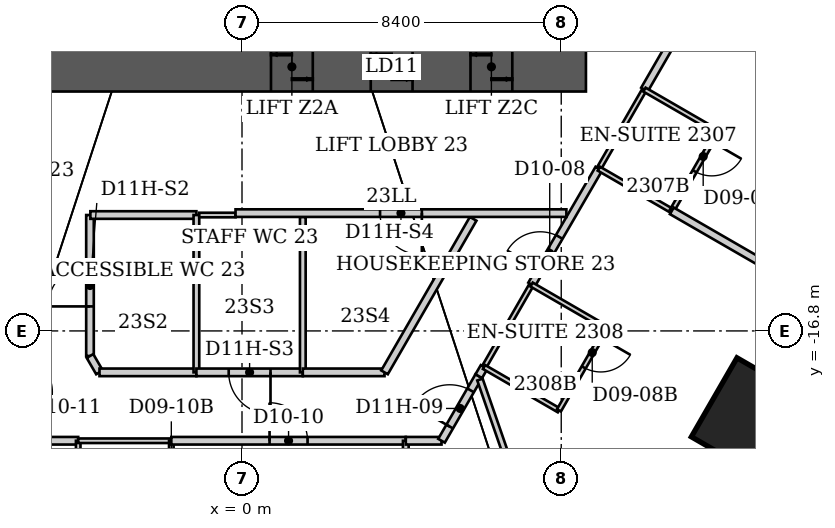
"""IFC4 building model, lengths in metres.
Left out: names, types, materials, properties, quantities, classifications, styles, units other than length and angle.
Written with IfcOpenShell. Run it as: python <this file> out.ifc"""

import sys

from ifc_helpers import new_model, si_unit, direction, frame, frame_2d, origin, origin_2d, place, context, subcontext, project, spatial, rectangle, extrude, clip, halfspace, element, fill, save


model = new_model("IFC4")
c1 = context("Model", 3, precision=1e-05, world=origin(), true_north=direction((0.0, 1.0)))
c2 = subcontext(c1, "Body", "Model", "MODEL_VIEW")
j1 = project(units=[si_unit("LENGTHUNIT", "METRE"), si_unit("PLANEANGLEUNIT", "RADIAN")], contexts=[c1])
p1 = place(None, origin())
s1 = spatial("IfcSite", under=j1, at=p1, CompositionType="ELEMENT")
p2 = place(p1, origin())
s2 = spatial("IfcBuilding", under=s1, at=p2, CompositionType="ELEMENT")
p3 = place(p2, frame((0.0, 0.0, 96.8)))
s3 = spatial("IfcBuildingStorey", under=s2, at=p3, CompositionType="ELEMENT", Elevation=96.8)
p4 = place(p3, frame((13.464, -19.147, -0.064), z_axis=(0.0, 0.0, 1.0), x_axis=(0.866025403784, -0.5, 0.0)))
e1 = element("IfcColumn", 1, at=p4, inside=s3, PredefinedType="COLUMN", context=c2, shape_type="SweptSolid", body=[
    clip(extrude(rectangle(XDim=2.4, YDim=2.4, at=origin_2d()), origin(), (0.0, 0.0, 1.0), 3.865), halfspace(frame((0.0, 0.0, 0.064)), True)),
])
p5 = place(p3, frame((-9.05, -9.85, 0.0), z_axis=(0.0, 0.0, 1.0), x_axis=(1.0, 0.0, 0.0)))
e2 = element("IfcWall", 2, at=p5, inside=s3, PredefinedType="SHEAR", context=c2, shape_type="SweptSolid", body=[
    extrude(rectangle(XDim=18.1, YDim=1.3, at=frame_2d((9.05, 0.0))), origin(), (0.0, 0.0, 1.0), 3.8),
])
p6 = place(p5, frame((1.938, 0.0, 0.0)))
e3 = element("IfcOpeningElement", 3, at=p6, cuts=e2, PredefinedType="OPENING", context=c2, shape_type="SweptSolid", body=[
    extrude(rectangle(XDim=1.1, YDim=2.2, at=frame_2d((0.55, 1.1))), frame((0.0, 0.65, 0.0), z_axis=(0.0, -1.0, 0.0), x_axis=(1.0, 0.0, 0.0)), (0.0, 0.0, 1.0), 1.3),
])
p7 = place(p5, frame((9.812, 0.0, 0.0)))
e4 = element("IfcOpeningElement", 4, at=p7, cuts=e2, PredefinedType="OPENING", context=c2, shape_type="SweptSolid", body=[
    extrude(rectangle(XDim=1.1, YDim=2.1, at=frame_2d((0.55, 1.05))), frame((0.0, 0.65, 0.0), z_axis=(0.0, -1.0, 0.0), x_axis=(1.0, 0.0, 0.0)), (0.0, 0.0, 1.0), 1.3),
])
p8 = place(p5, frame((12.438, 0.0, 0.0)))
e5 = element("IfcOpeningElement", 5, at=p8, cuts=e2, PredefinedType="OPENING", context=c2, shape_type="SweptSolid", body=[
    extrude(rectangle(XDim=1.1, YDim=2.1, at=frame_2d((0.55, 1.05))), frame((0.0, 0.65, 0.0), z_axis=(0.0, -1.0, 0.0), x_axis=(1.0, 0.0, 0.0)), (0.0, 0.0, 1.0), 1.3),
])
p9 = place(p5, frame((15.062, 0.0, 0.0)))
e6 = element("IfcOpeningElement", 6, at=p9, cuts=e2, PredefinedType="OPENING", context=c2, shape_type="SweptSolid", body=[
    extrude(rectangle(XDim=1.1, YDim=2.1, at=frame_2d((0.55, 1.05))), frame((0.0, 0.65, 0.0), z_axis=(0.0, -1.0, 0.0), x_axis=(1.0, 0.0, 0.0)), (0.0, 0.0, 1.0), 1.3),
])
p10 = place(p3, frame((11.024, -29.171, 0.0), z_axis=(0.0, 0.0, 1.0), x_axis=(0.499999235055, 0.866025845425, 0.0)))
e7 = element("IfcWall", 7, at=p10, inside=s3, PredefinedType="PARAPET", context=c2, shape_type="SweptSolid", body=[
    extrude(rectangle(XDim=39.5, YDim=0.25, at=frame_2d((19.75, 0.0))), origin(), (0.0, 0.0, 1.0), 1.1),
])
p11 = place(p3, frame((-5.25, -19.69, 0.0), z_axis=(0.0, 0.0, 1.0), x_axis=(1.0, 0.0, 0.0)))
e8 = element("IfcWall", 8, at=p11, inside=s3, PredefinedType="PARTITIONING", context=c2, shape_type="SweptSolid", body=[
    extrude(rectangle(XDim=0.94, YDim=0.2, at=frame_2d((0.47, 0.0))), origin(), (0.0, 0.0, 1.0), 3.64),
])
p12 = place(p3, frame((-4.31, -22.36, 0.0), z_axis=(0.0, 0.0, 1.0), x_axis=(0.0, 1.0, 0.0)))
e9 = element("IfcWall", 9, at=p12, inside=s3, PredefinedType="PARTITIONING", context=c2, shape_type="SweptSolid", body=[
    extrude(rectangle(XDim=2.67, YDim=0.12, at=frame_2d((1.335, 0.0))), origin(), (0.0, 0.0, 1.0), 3.64),
])
p13 = place(p3, frame((-4.31, -19.69, 0.0), z_axis=(0.0, 0.0, 1.0), x_axis=(1.0, 0.0, 0.0)))
e10 = element("IfcWall", 10, at=p13, inside=s3, PredefinedType="PARTITIONING", context=c2, shape_type="SweptSolid", body=[
    extrude(rectangle(XDim=2.45, YDim=0.12, at=frame_2d((1.225, 0.0))), origin(), (0.0, 0.0, 1.0), 3.64),
])
p14 = place(p3, frame((-4.0, -17.46, 0.0), z_axis=(0.0, 0.0, 1.0), x_axis=(0.0, 1.0, 0.0)))
e11 = element("IfcWall", 11, at=p14, inside=s3, PredefinedType="PARTITIONING", context=c2, shape_type="SweptSolid", body=[
    extrude(rectangle(XDim=3.71, YDim=0.2, at=frame_2d((1.855, 0.0))), origin(), (0.0, 0.0, 1.0), 2.878),
])
p15 = place(p14, frame((1.305, 0.0, 0.0)))
e12 = element("IfcOpeningElement", 12, at=p15, cuts=e11, PredefinedType="OPENING", context=c2, shape_type="SweptSolid", body=[
    extrude(rectangle(XDim=1.1, YDim=2.2, at=frame_2d((0.55, 1.1))), frame((0.0, 0.1, 0.0), z_axis=(0.0, -1.0, 0.0), x_axis=(1.0, 0.0, 0.0)), (0.0, 0.0, 1.0), 0.2),
])
p16 = place(p3, frame((-3.99, -13.75, 0.0), z_axis=(0.0, 0.0, 1.0), x_axis=(1.0, 0.0, 0.0)))
e13 = element("IfcWall", 13, at=p16, inside=s3, PredefinedType="PARTITIONING", context=c2, shape_type="SweptSolid", body=[
    extrude(rectangle(XDim=2.79, YDim=0.2, at=frame_2d((1.395, 0.0))), origin(), (0.0, 0.0, 1.0), 3.64),
])
p17 = place(p3, frame((-3.75, -17.89, 0.0), z_axis=(0.0, 0.0, 1.0), x_axis=(-0.502680181512, 0.864472460588, 0.0)))
e14 = element("IfcWall", 14, at=p17, inside=s3, PredefinedType="PARTITIONING", context=c2, shape_type="SweptSolid", body=[
    extrude(rectangle(XDim=0.497, YDim=0.2, at=frame_2d((0.249, 0.0))), origin(), (0.0, 0.0, 1.0), 3.64),
])
p18 = place(p3, frame((-1.86, -22.36, 0.0), z_axis=(0.0, 0.0, 1.0), x_axis=(0.0, 1.0, 0.0)))
e15 = element("IfcWall", 15, at=p18, inside=s3, PredefinedType="PARTITIONING", context=c2, shape_type="SweptSolid", body=[
    extrude(rectangle(XDim=2.67, YDim=0.12, at=frame_2d((1.335, 0.0))), origin(), (0.0, 0.0, 1.0), 2.86),
])
p19 = place(p18, frame((1.47, 0.0, 0.0)))
e16 = element("IfcOpeningElement", 16, at=p19, cuts=e15, PredefinedType="OPENING", context=c2, shape_type="SweptSolid", body=[
    extrude(rectangle(XDim=0.9, YDim=2.03, at=frame_2d((0.45, 1.015))), frame((0.0, 0.06, 0.0), z_axis=(0.0, -1.0, 0.0), x_axis=(1.0, 0.0, 0.0)), (0.0, 0.0, 1.0), 0.12),
])
p20 = place(p3, frame((-1.86, -19.69, 0.0), z_axis=(0.0, 0.0, 1.0), x_axis=(1.0, 0.0, 0.0)))
e17 = element("IfcWall", 17, at=p20, inside=s3, PredefinedType="PARTITIONING", context=c2, shape_type="SweptSolid", body=[
    extrude(rectangle(XDim=6.17, YDim=0.2, at=frame_2d((3.085, 0.0))), origin(), (0.0, 0.0, 1.0), 3.64),
])
p21 = place(p20, frame((2.585, 0.0, 0.0)))
e18 = element("IfcOpeningElement", 18, at=p21, cuts=e17, PredefinedType="OPENING", context=c2, shape_type="SweptSolid", body=[
    extrude(rectangle(XDim=1.0, YDim=2.13, at=frame_2d((0.5, 1.065))), frame((0.0, 0.1, 0.0), z_axis=(0.0, -1.0, 0.0), x_axis=(1.0, 0.0, 0.0)), (0.0, 0.0, 1.0), 0.2),
])
p22 = place(p3, frame((-1.2, -17.89, 0.0), z_axis=(0.0, 0.0, 1.0), x_axis=(-1.0, 0.0, 0.0)))
e19 = element("IfcWall", 19, at=p22, inside=s3, PredefinedType="PARTITIONING", context=c2, shape_type="SweptSolid", body=[
    extrude(rectangle(XDim=2.55, YDim=0.2, at=frame_2d((1.275, 0.0))), origin(), (0.0, 0.0, 1.0), 3.64),
])
p23 = place(p3, frame((-1.2, -13.75, 0.0), z_axis=(0.0, 0.0, 1.0), x_axis=(0.0, -1.0, 0.0)))
e20 = element("IfcWall", 20, at=p23, inside=s3, PredefinedType="PARTITIONING", context=c2, shape_type="SweptSolid", body=[
    extrude(rectangle(XDim=4.14, YDim=0.15, at=frame_2d((2.07, 0.0))), origin(), (0.0, 0.0, 1.0), 3.64),
])
p24 = place(p3, frame((-1.125, -13.75, 0.0), z_axis=(0.0, 0.0, 1.0), x_axis=(1.0, 0.0, 0.0)))
e21 = element("IfcWall", 21, at=p24, inside=s3, PredefinedType="PARTITIONING", context=c2, shape_type="SweptSolid", body=[
    extrude(rectangle(XDim=0.955, YDim=0.12, at=frame_2d((0.478, 0.0))), origin(), (0.0, 0.0, 1.0), 3.64),
])
p25 = place(p3, frame((1.6, -17.89, 0.0), z_axis=(0.0, 0.0, 1.0), x_axis=(-1.0, 0.0, 0.0)))
e22 = element("IfcWall", 22, at=p25, inside=s3, PredefinedType="PARTITIONING", context=c2, shape_type="SweptSolid", body=[
    extrude(rectangle(XDim=2.8, YDim=0.2, at=frame_2d((1.4, 0.0))), origin(), (0.0, 0.0, 1.0), 3.64),
])
p26 = place(p25, frame((0.85, 0.0, 0.0)))
e23 = element("IfcOpeningElement", 23, at=p26, cuts=e22, PredefinedType="OPENING", context=c2, shape_type="SweptSolid", body=[
    extrude(rectangle(XDim=1.1, YDim=2.2, at=frame_2d((0.55, 1.1))), frame((0.0, 0.1, 0.0), z_axis=(0.0, -1.0, 0.0), x_axis=(1.0, 0.0, 0.0)), (0.0, 0.0, 1.0), 0.2),
])
p27 = place(p3, frame((1.6, -13.8, 0.0), z_axis=(0.0, 0.0, 1.0), x_axis=(0.0, -1.0, 0.0)))
e24 = element("IfcWall", 24, at=p27, inside=s3, PredefinedType="PARTITIONING", context=c2, shape_type="SweptSolid", body=[
    extrude(rectangle(XDim=4.09, YDim=0.15, at=frame_2d((2.045, 0.0))), origin(), (0.0, 0.0, 1.0), 3.64),
])
p28 = place(p3, frame((3.75, -17.89, 0.0), z_axis=(0.0, 0.0, 1.0), x_axis=(-1.0, 0.0, 0.0)))
e25 = element("IfcWall", 25, at=p28, inside=s3, PredefinedType="PARTITIONING", context=c2, shape_type="SweptSolid", body=[
    extrude(rectangle(XDim=2.15, YDim=0.2, at=frame_2d((1.075, 0.0))), origin(), (0.0, 0.0, 1.0), 3.64),
])
p29 = place(p3, frame((4.31, -28.07, 0.0), z_axis=(0.0, 0.0, 1.0), x_axis=(0.0, 1.0, 0.0)))
e26 = element("IfcWall", 26, at=p29, inside=s3, PredefinedType="PARTITIONING", context=c2, shape_type="SweptSolid", body=[
    extrude(rectangle(XDim=8.38, YDim=0.15, at=frame_2d((4.19, 0.0))), origin(), (0.0, 0.0, 1.0), 3.64),
])
p30 = place(p3, frame((4.31, -19.69, 0.0), z_axis=(0.0, 0.0, 1.0), x_axis=(1.0, 0.0, 0.0)))
e27 = element("IfcWall", 27, at=p30, inside=s3, PredefinedType="PARTITIONING", context=c2, shape_type="SweptSolid", body=[
    extrude(rectangle(XDim=0.94, YDim=0.2, at=frame_2d((0.47, 0.0))), origin(), (0.0, 0.0, 1.0), 3.64),
])
p31 = place(p3, frame((5.25, -19.69, 0.0), z_axis=(0.0, 0.0, 1.0), x_axis=(0.499431599995, 0.866353321068, 0.0)))
e28 = element("IfcWall", 28, at=p31, inside=s3, PredefinedType="PARTITIONING", context=c2, shape_type="SweptSolid", body=[
    extrude(rectangle(XDim=1.962, YDim=0.2, at=frame_2d((0.981, 0.0))), origin(), (0.0, 0.0, 1.0), 3.64),
])
p32 = place(p31, frame((0.431, 0.0, 0.0)))
e29 = element("IfcOpeningElement", 29, at=p32, cuts=e28, PredefinedType="OPENING", context=c2, shape_type="SweptSolid", body=[
    extrude(rectangle(XDim=1.1, YDim=2.2, at=frame_2d((0.55, 1.1))), frame((0.0, 0.1, 0.0), z_axis=(0.0, -1.0, 0.0), x_axis=(1.0, 0.0, 0.0)), (0.0, 0.0, 1.0), 0.2),
])
p33 = place(p3, frame((6.083, -13.85, 0.0), z_axis=(0.0, 0.0, 1.0), x_axis=(-0.499977643516, -0.866038310922, 0.0)))
e30 = element("IfcWall", 30, at=p33, inside=s3, PredefinedType="PARTITIONING", context=c2, shape_type="SweptSolid", body=[
    extrude(rectangle(XDim=4.665, YDim=0.2, at=frame_2d((2.333, 0.0))), origin(), (0.0, 0.0, 1.0), 3.64),
])
p34 = place(p3, frame((6.23, -17.99, 0.0), z_axis=(0.0, 0.0, 1.0), x_axis=(0.503597773627, 0.863938239921, 0.0)))
e31 = element("IfcWall", 31, at=p34, inside=s3, PredefinedType="PARTITIONING", context=c2, shape_type="SweptSolid", body=[
    extrude(rectangle(XDim=0.278, YDim=0.2, at=frame_2d((0.139, 0.0))), origin(), (0.0, 0.0, 1.0), 3.64),
])
p35 = place(p3, frame((6.37, -17.75, 0.0), z_axis=(0.0, 0.0, 1.0), x_axis=(0.499159685399, 0.866510016372, 0.0)))
e32 = element("IfcWall", 32, at=p35, inside=s3, PredefinedType="PARTITIONING", context=c2, shape_type="SweptSolid", body=[
    extrude(rectangle(XDim=2.504, YDim=0.12, at=frame_2d((1.252, 0.0))), origin(), (0.0, 0.0, 1.0), 3.64),
])
p36 = place(p3, frame((6.37, -17.75, 0.0), z_axis=(0.0, 0.0, 1.0), x_axis=(0.865543766642, -0.500833293649, 0.0)))
e33 = element("IfcWall", 33, at=p36, inside=s3, PredefinedType="PARTITIONING", context=c2, shape_type="SweptSolid", body=[
    extrude(rectangle(XDim=2.276, YDim=0.12, at=frame_2d((1.138, 0.0))), origin(), (0.0, 0.0, 1.0), 3.64),
])
p37 = place(p3, frame((7.62, -15.58, 0.0), z_axis=(0.0, 0.0, 1.0), x_axis=(0.501876608556, 0.864939228954, 0.0)))
e34 = element("IfcWall", 34, at=p37, inside=s3, PredefinedType="PARTITIONING", context=c2, shape_type="SweptSolid", body=[
    extrude(rectangle(XDim=3.526, YDim=0.2, at=frame_2d((1.763, 0.0))), origin(), (0.0, 0.0, 1.0), 3.64),
])
p38 = place(p37, frame((0.45, 0.0, 0.0)))
e35 = element("IfcOpeningElement", 35, at=p38, cuts=e34, PredefinedType="OPENING", context=c2, shape_type="SweptSolid", body=[
    extrude(rectangle(XDim=1.0, YDim=2.13, at=frame_2d((0.5, 1.065))), frame((0.0, 0.1, 0.0), z_axis=(0.0, -1.0, 0.0), x_axis=(1.0, 0.0, 0.0)), (0.0, 0.0, 1.0), 0.2),
])
p39 = place(p3, frame((8.34, -18.89, 0.0), z_axis=(0.0, 0.0, 1.0), x_axis=(0.499159685399, 0.866510016372, 0.0)))
e36 = element("IfcWall", 36, at=p39, inside=s3, PredefinedType="PARTITIONING", context=c2, shape_type="SweptSolid", body=[
    extrude(rectangle(XDim=2.504, YDim=0.12, at=frame_2d((1.252, 0.0))), origin(), (0.0, 0.0, 1.0), 3.64),
])
p40 = place(p39, frame((1.304, 0.0, 0.0)))
e37 = element("IfcOpeningElement", 37, at=p40, cuts=e36, PredefinedType="OPENING", context=c2, shape_type="SweptSolid", body=[
    extrude(rectangle(XDim=0.9, YDim=2.03, at=frame_2d((0.45, 1.015))), frame((0.0, 0.06, 0.0), z_axis=(0.0, -1.0, 0.0), x_axis=(1.0, 0.0, 0.0)), (0.0, 0.0, 1.0), 0.12),
])
p41 = place(p3, frame((8.535, -13.7, 0.0), z_axis=(0.0, 0.0, 1.0), x_axis=(-1.0, 0.0, 0.0)))
e38 = element("IfcWall", 38, at=p41, inside=s3, PredefinedType="PARTITIONING", context=c2, shape_type="SweptSolid", body=[
    extrude(rectangle(XDim=8.705, YDim=0.2, at=frame_2d((4.353, 0.0))), origin(), (0.0, 0.0, 1.0), 3.64),
])
p42 = place(p41, frame((3.802, 0.0, 0.0)))
e39 = element("IfcOpeningElement", 39, at=p42, cuts=e38, PredefinedType="OPENING", context=c2, shape_type="SweptSolid", body=[
    extrude(rectangle(XDim=1.1, YDim=2.2, at=frame_2d((0.55, 1.1))), frame((0.0, 0.1, 0.0), z_axis=(0.0, -1.0, 0.0), x_axis=(1.0, 0.0, 0.0)), (0.0, 0.0, 1.0), 0.2),
])
p43 = place(p3, frame((9.39, -12.53, 0.0), z_axis=(0.0, 0.0, 1.0), x_axis=(0.499769390944, 0.866158505053, 0.0)))
e40 = element("IfcWall", 40, at=p43, inside=s3, PredefinedType="PARTITIONING", context=c2, shape_type="SweptSolid", body=[
    extrude(rectangle(XDim=2.402, YDim=0.12, at=frame_2d((1.201, 0.0))), origin(), (0.0, 0.0, 1.0), 3.64),
])
p44 = place(p3, frame((9.39, -12.53, 0.0), z_axis=(0.0, 0.0, 1.0), x_axis=(0.865732595383, -0.500506816428, 0.0)))
e41 = element("IfcWall", 41, at=p44, inside=s3, PredefinedType="PARTITIONING", context=c2, shape_type="SweptSolid", body=[
    extrude(rectangle(XDim=2.218, YDim=0.12, at=frame_2d((1.109, 0.0))), origin(), (0.0, 0.0, 1.0), 3.64),
])
p45 = place(p3, frame((9.58, -27.652, 0.0), z_axis=(0.0, 0.0, 1.0), x_axis=(-0.327598862793, 0.944816905594, 0.0)))
e42 = element("IfcWall", 42, at=p45, inside=s3, PredefinedType="PARTITIONING", context=c2, shape_type="SweptSolid", body=[
    extrude(rectangle(XDim=10.131, YDim=0.15, at=frame_2d((5.065, 0.0))), origin(), (0.0, 0.0, 1.0), 3.64),
])
p46 = place(p3, frame((9.59, -16.72, 0.0), z_axis=(0.0, 0.0, 1.0), x_axis=(-0.865570669302, 0.500786797394, 0.0)))
e43 = element("IfcWall", 43, at=p46, inside=s3, PredefinedType="PARTITIONING", context=c2, shape_type="SweptSolid", body=[
    extrude(rectangle(XDim=2.276, YDim=0.12, at=frame_2d((1.138, 0.0))), origin(), (0.0, 0.0, 1.0), 3.64),
])
p47 = place(p3, frame((10.59, -10.45, 0.0), z_axis=(0.0, 0.0, 1.0), x_axis=(0.500072306674, 0.865983653482, 0.0)))
e44 = element("IfcWall", 44, at=p47, inside=s3, PredefinedType="PARTITIONING", context=c2, shape_type="SweptSolid", body=[
    extrude(rectangle(XDim=8.719, YDim=0.2, at=frame_2d((4.359, 0.0))), origin(), (0.0, 0.0, 1.0), 3.64),
])
p48 = place(p47, frame((3.859, 0.0, 0.0)))
e45 = element("IfcOpeningElement", 45, at=p48, cuts=e44, PredefinedType="OPENING", context=c2, shape_type="SweptSolid", body=[
    extrude(rectangle(XDim=1.0, YDim=2.13, at=frame_2d((0.5, 1.065))), frame((0.0, 0.1, 0.0), z_axis=(0.0, -1.0, 0.0), x_axis=(1.0, 0.0, 0.0)), (0.0, 0.0, 1.0), 0.2),
])
p49 = place(p3, frame((11.31, -13.64, 0.0), z_axis=(0.0, 0.0, 1.0), x_axis=(0.499737123639, 0.866177122335, 0.0)))
e46 = element("IfcWall", 46, at=p49, inside=s3, PredefinedType="PARTITIONING", context=c2, shape_type="SweptSolid", body=[
    extrude(rectangle(XDim=2.401, YDim=0.12, at=frame_2d((1.201, 0.0))), origin(), (0.0, 0.0, 1.0), 3.64),
])
p50 = place(p49, frame((1.201, 0.0, 0.0)))
e47 = element("IfcOpeningElement", 47, at=p50, cuts=e46, PredefinedType="OPENING", context=c2, shape_type="SweptSolid", body=[
    extrude(rectangle(XDim=0.9, YDim=2.03, at=frame_2d((0.45, 1.015))), frame((0.0, 0.06, 0.0), z_axis=(0.0, -1.0, 0.0), x_axis=(1.0, 0.0, 0.0)), (0.0, 0.0, 1.0), 0.12),
])
p51 = place(p3, frame((11.31, -13.64, 0.0), z_axis=(0.0, 0.0, 1.0), x_axis=(0.865919350456, -0.50018364478, 0.0)))
e48 = element("IfcWall", 48, at=p51, inside=s3, PredefinedType="PARTITIONING", context=c2, shape_type="SweptSolid", body=[
    extrude(rectangle(XDim=5.758, YDim=0.2, at=frame_2d((2.879, 0.0))), origin(), (0.0, 0.0, 1.0), 3.64),
])
p52 = place(p3, frame((12.51, -11.56, 0.0), z_axis=(0.0, 0.0, 1.0), x_axis=(-0.865705017107, 0.500554515868, 0.0)))
e49 = element("IfcWall", 49, at=p52, inside=s3, PredefinedType="PARTITIONING", context=c2, shape_type="SweptSolid", body=[
    extrude(rectangle(XDim=2.218, YDim=0.12, at=frame_2d((1.109, 0.0))), origin(), (0.0, 0.0, 1.0), 3.64),
])
p53 = place(p50, origin())
e50 = element("IfcDoor", 50, at=p53, inside=s3, OperationType="SINGLE_SWING_RIGHT", PredefinedType="DOOR", context=c2, shape_type="SweptSolid", body=[
    extrude(rectangle(XDim=0.9, YDim=2.03, at=frame_2d((0.45, 1.015))), frame((0.0, 0.025, 0.0), z_axis=(0.0, -1.0, 0.0), x_axis=(1.0, 0.0, 0.0)), (0.0, 0.0, 1.0), 0.05),
])
fill(e47, e50)
p54 = place(p38, origin())
e51 = element("IfcDoor", 51, at=p54, inside=s3, OperationType="SINGLE_SWING_LEFT", PredefinedType="DOOR", context=c2, shape_type="SweptSolid", body=[
    extrude(rectangle(XDim=1.0, YDim=2.13, at=frame_2d((0.5, 1.065))), frame((0.0, 0.025, 0.0), z_axis=(0.0, -1.0, 0.0), x_axis=(1.0, 0.0, 0.0)), (0.0, 0.0, 1.0), 0.05),
])
fill(e35, e51)
p55 = place(p40, origin())
e52 = element("IfcDoor", 52, at=p55, inside=s3, OperationType="SINGLE_SWING_RIGHT", PredefinedType="DOOR", context=c2, shape_type="SweptSolid", body=[
    extrude(rectangle(XDim=0.9, YDim=2.03, at=frame_2d((0.45, 1.015))), frame((0.0, 0.025, 0.0), z_axis=(0.0, -1.0, 0.0), x_axis=(1.0, 0.0, 0.0)), (0.0, 0.0, 1.0), 0.05),
])
fill(e37, e52)
p56 = place(p32, origin())
e53 = element("IfcDoor", 53, at=p56, inside=s3, OperationType="SINGLE_SWING_LEFT", PredefinedType="DOOR", context=c2, shape_type="SweptSolid", body=[
    extrude(rectangle(XDim=1.1, YDim=2.2, at=frame_2d((0.55, 1.1))), frame((0.0, 0.025, 0.0), z_axis=(0.0, -1.0, 0.0), x_axis=(1.0, 0.0, 0.0)), (0.0, 0.0, 1.0), 0.05),
])
fill(e29, e53)
p57 = place(p21, origin())
e54 = element("IfcDoor", 54, at=p57, inside=s3, OperationType="SINGLE_SWING_LEFT", PredefinedType="DOOR", context=c2, shape_type="SweptSolid", body=[
    extrude(rectangle(XDim=1.0, YDim=2.13, at=frame_2d((0.5, 1.065))), frame((0.0, 0.025, 0.0), z_axis=(0.0, -1.0, 0.0), x_axis=(1.0, 0.0, 0.0)), (0.0, 0.0, 1.0), 0.05),
])
fill(e18, e54)
p58 = place(p15, origin())
e55 = element("IfcDoor", 55, at=p58, inside=s3, OperationType="SINGLE_SWING_LEFT", PredefinedType="DOOR", context=c2, shape_type="SweptSolid", body=[
    extrude(rectangle(XDim=1.1, YDim=2.2, at=frame_2d((0.55, 1.1))), frame((0.0, 0.025, 0.0), z_axis=(0.0, -1.0, 0.0), x_axis=(1.0, 0.0, 0.0)), (0.0, 0.0, 1.0), 0.05),
])
fill(e12, e55)
p59 = place(p26, origin())
e56 = element("IfcDoor", 56, at=p59, inside=s3, OperationType="SINGLE_SWING_LEFT", PredefinedType="DOOR", context=c2, shape_type="SweptSolid", body=[
    extrude(rectangle(XDim=1.1, YDim=2.2, at=frame_2d((0.55, 1.1))), frame((0.0, 0.025, 0.0), z_axis=(0.0, -1.0, 0.0), x_axis=(1.0, 0.0, 0.0)), (0.0, 0.0, 1.0), 0.05),
])
fill(e23, e56)
p60 = place(p42, origin())
e57 = element("IfcDoor", 57, at=p60, inside=s3, OperationType="SINGLE_SWING_LEFT", PredefinedType="DOOR", context=c2, shape_type="SweptSolid", body=[
    extrude(rectangle(XDim=1.1, YDim=2.2, at=frame_2d((0.55, 1.1))), frame((0.0, 0.025, 0.0), z_axis=(0.0, -1.0, 0.0), x_axis=(1.0, 0.0, 0.0)), (0.0, 0.0, 1.0), 0.05),
])
fill(e39, e57)
p61 = place(p7, origin())
e58 = element("IfcDoor", 58, at=p61, inside=s3, OperationType="DOUBLE_DOOR_SLIDING", PredefinedType="DOOR", context=c2, shape_type="SweptSolid", body=[
    extrude(rectangle(XDim=1.1, YDim=2.1, at=frame_2d((0.55, 1.05))), frame((0.0, 0.025, 0.0), z_axis=(0.0, -1.0, 0.0), x_axis=(1.0, 0.0, 0.0)), (0.0, 0.0, 1.0), 0.05),
])
fill(e4, e58)
p62 = place(p8, origin())
e59 = element("IfcDoor", 59, at=p62, inside=s3, OperationType="DOUBLE_DOOR_SLIDING", PredefinedType="DOOR", context=c2, shape_type="SweptSolid", body=[
    extrude(rectangle(XDim=1.1, YDim=2.1, at=frame_2d((0.55, 1.05))), frame((0.0, 0.025, 0.0), z_axis=(0.0, -1.0, 0.0), x_axis=(1.0, 0.0, 0.0)), (0.0, 0.0, 1.0), 0.05),
])
fill(e5, e59)
p63 = place(p9, origin())
e60 = element("IfcDoor", 60, at=p63, inside=s3, OperationType="DOUBLE_DOOR_SLIDING", PredefinedType="DOOR", context=c2, shape_type="SweptSolid", body=[
    extrude(rectangle(XDim=1.1, YDim=2.1, at=frame_2d((0.55, 1.05))), frame((0.0, 0.025, 0.0), z_axis=(0.0, -1.0, 0.0), x_axis=(1.0, 0.0, 0.0)), (0.0, 0.0, 1.0), 0.05),
])
fill(e6, e60)
save(model, sys.argv[1])
